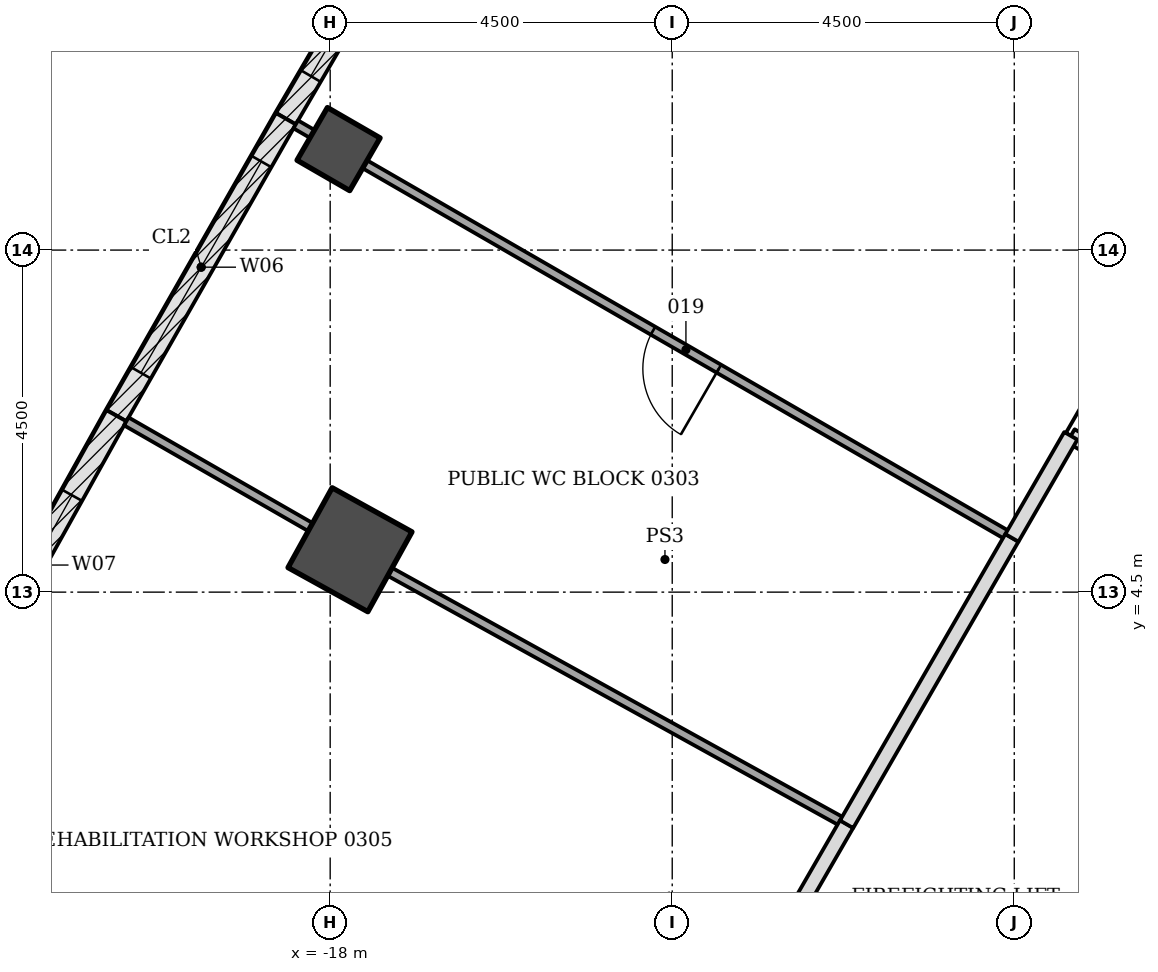
"""IFC4 building model, lengths in metres.
Left out: names, types, materials, properties, quantities, classifications, styles, units other than length and angle.
Written with IfcOpenShell. Run it as: python <this file> out.ifc"""

import sys

from ifc_helpers import new_model, si_unit, direction, frame, frame_2d, origin, origin_2d, place, context, subcontext, project, spatial, rectangle, extrude, element, fill, save


model = new_model("IFC4")
c1 = context("Model", 3, precision=1e-05, world=origin(), true_north=direction((0.0, 1.0)))
c2 = subcontext(c1, "Body", "Model", "MODEL_VIEW")
j1 = project(units=[si_unit("LENGTHUNIT", "METRE"), si_unit("PLANEANGLEUNIT", "RADIAN")], contexts=[c1])
p1 = place(None, origin())
s1 = spatial("IfcSite", under=j1, at=p1, CompositionType="ELEMENT")
p2 = place(p1, origin())
s2 = spatial("IfcBuilding", under=s1, at=p2, CompositionType="ELEMENT")
p3 = place(p2, frame((0.0, 0.0, 15.0)))
s3 = spatial("IfcBuildingStorey", under=s2, at=p3, CompositionType="ELEMENT", Elevation=15.0)
p4 = place(p3, frame((-17.739, 5.058, -0.25), z_axis=(0.0, 0.0, 1.0), x_axis=(-0.875152760281, 0.483846717641, 0.0)))
e1 = element("IfcColumn", 1, at=p4, inside=s3, PredefinedType="COLUMN", context=c2, shape_type="SweptSolid", body=[
    extrude(rectangle(XDim=1.2, YDim=1.2, at=origin_2d()), origin(), (0.0, 0.0, 1.0), 4.5),
])
p5 = place(p3, frame((-17.89, 10.329, -0.25), z_axis=(0.0, 0.0, 1.0), x_axis=(-0.866025403784, 0.5, 0.0)))
e2 = element("IfcColumn", 2, at=p5, inside=s3, PredefinedType="COLUMN", context=c2, shape_type="SweptSolid", body=[
    extrude(rectangle(XDim=0.8, YDim=0.8, at=origin_2d()), origin(), (0.0, 0.0, 1.0), 4.5),
])
p6 = place(p3, frame((-1.083, 11.281, -0.25), z_axis=(0.0, 0.0, 1.0), x_axis=(-0.500001446645, -0.866024568562, 0.0)))
e3 = element("IfcWall", 3, at=p6, inside=s3, PredefinedType="SHEAR", context=c2, shape_type="SweptSolid", body=[
    extrude(rectangle(XDim=18.458, YDim=0.7, at=frame_2d((9.229, 0.0))), origin(), (0.0, 0.0, 1.0), 4.5),
])
p7 = place(p6, frame((8.979, 0.0, 0.25)))
e4 = element("IfcOpeningElement", 4, at=p7, cuts=e3, PredefinedType="OPENING", context=c2, shape_type="SweptSolid", body=[
    extrude(rectangle(XDim=1.2, YDim=2.1, at=frame_2d((0.6, 1.05))), frame((0.0, 0.36, 0.0), z_axis=(0.0, -1.0, 0.0), x_axis=(1.0, 0.0, 0.0)), (0.0, 0.0, 1.0), 0.72),
])
p8 = place(p6, frame((11.029, 0.0, 0.25)))
e5 = element("IfcOpeningElement", 5, at=p8, cuts=e3, PredefinedType="OPENING", context=c2, shape_type="SweptSolid", body=[
    extrude(rectangle(XDim=1.2, YDim=2.1, at=frame_2d((0.6, 1.05))), frame((0.0, 0.36, 0.0), z_axis=(0.0, -1.0, 0.0), x_axis=(1.0, 0.0, 0.0)), (0.0, 0.0, 1.0), 0.72),
])
p9 = place(p3, frame((-18.582, 10.73, 0.0), z_axis=(0.0, 0.0, 1.0), x_axis=(0.50445499627, 0.86343798662, 0.0)))
e6 = element("IfcWall", 6, at=p9, inside=s3, PredefinedType="NOTDEFINED", context=c2, shape_type="SweptSolid", body=[
    extrude(rectangle(XDim=4.496, YDim=0.3, at=frame_2d((2.248, 0.0))), origin(), (0.0, 0.0, 1.0), 4.25),
])
p10 = place(p9, frame((0.648, 0.0, 0.8)))
e7 = element("IfcOpeningElement", 7, at=p10, cuts=e6, PredefinedType="OPENING", context=c2, shape_type="SweptSolid", body=[
    extrude(rectangle(XDim=3.2, YDim=2.7, at=frame_2d((1.6, 1.35))), frame((0.0, 0.16, 0.0), z_axis=(0.0, -1.0, 0.0), x_axis=(1.0, 0.0, 0.0)), (0.0, 0.0, 1.0), 0.32),
])
p11 = place(p3, frame((-20.811, 6.823, 0.0), z_axis=(0.0, 0.0, 1.0), x_axis=(0.495524760411, 0.868593812907, 0.0)))
e8 = element("IfcWall", 8, at=p11, inside=s3, PredefinedType="NOTDEFINED", context=c2, shape_type="SweptSolid", body=[
    extrude(rectangle(XDim=4.496, YDim=0.3, at=frame_2d((2.248, 0.0))), origin(), (0.0, 0.0, 1.0), 4.25),
])
p12 = place(p11, frame((0.648, 0.0, 0.8)))
e9 = element("IfcOpeningElement", 9, at=p12, cuts=e8, PredefinedType="OPENING", context=c2, shape_type="SweptSolid", body=[
    extrude(rectangle(XDim=3.2, YDim=2.7, at=frame_2d((1.6, 1.35))), frame((0.0, 0.16, 0.0), z_axis=(0.0, -1.0, 0.0), x_axis=(1.0, 0.0, 0.0)), (0.0, 0.0, 1.0), 0.32),
])
p13 = place(p3, frame((-23.0, 2.893, 0.0), z_axis=(0.0, 0.0, 1.0), x_axis=(0.486606252415, 0.873621402617, 0.0)))
e10 = element("IfcWall", 10, at=p13, inside=s3, PredefinedType="NOTDEFINED", context=c2, shape_type="SweptSolid", body=[
    extrude(rectangle(XDim=4.496, YDim=0.3, at=frame_2d((2.248, 0.0))), origin(), (0.0, 0.0, 1.0), 4.25),
])
p14 = place(p13, frame((1.198, 0.0, 0.8)))
e11 = element("IfcOpeningElement", 11, at=p14, cuts=e10, PredefinedType="OPENING", context=c2, shape_type="SweptSolid", body=[
    extrude(rectangle(XDim=2.1, YDim=3.0, at=frame_2d((1.05, 1.5))), frame((0.0, 0.16, 0.0), z_axis=(0.0, -1.0, 0.0), x_axis=(1.0, 0.0, 0.0)), (0.0, 0.0, 1.0), 0.32),
])
p15 = place(p3, frame((-12.635, -1.028, 0.0), z_axis=(0.0, 0.0, 1.0), x_axis=(0.499801250411, 0.866140121509, 0.0)))
e12 = element("IfcWall", 12, at=p15, inside=s3, PredefinedType="PARTITIONING", context=c2, shape_type="SweptSolid", body=[
    extrude(rectangle(XDim=2.861, YDim=0.2, at=frame_2d((1.431, 0.0))), origin(), (0.0, 0.0, 1.0), 3.638),
])
p16 = place(p3, frame((-18.26, 5.356, 0.0), z_axis=(0.0, 0.0, 1.0), x_axis=(-0.867283853893, 0.49781393791, 0.0)))
e13 = element("IfcWall", 13, at=p16, inside=s3, PredefinedType="PARTITIONING", context=c2, shape_type="SweptSolid", body=[
    extrude(rectangle(XDim=2.792, YDim=0.12, at=frame_2d((1.396, 0.0))), origin(), (0.0, 0.0, 1.0), 3.633),
])
p17 = place(p3, frame((-11.208, 1.446, 0.0), z_axis=(0.0, 0.0, 1.0), x_axis=(-0.875125393946, 0.483896212912, 0.0)))
e14 = element("IfcWall", 14, at=p17, inside=s3, PredefinedType="PARTITIONING", context=c2, shape_type="SweptSolid", body=[
    extrude(rectangle(XDim=6.863, YDim=0.12, at=frame_2d((3.432, 0.0))), origin(), (0.0, 0.0, 1.0), 3.638),
])
p18 = place(p3, frame((-9.032, 5.213, 0.0), z_axis=(0.0, 0.0, 1.0), x_axis=(-0.499876332206, -0.866096791646, 0.0)))
e15 = element("IfcWall", 15, at=p18, inside=s3, PredefinedType="PARTITIONING", context=c2, shape_type="SweptSolid", body=[
    extrude(rectangle(XDim=4.349, YDim=0.2, at=frame_2d((2.175, 0.0))), origin(), (0.0, 0.0, 1.0), 3.638),
])
p19 = place(p3, frame((-5.226, 4.806, 0.0), z_axis=(0.0, 0.0, 1.0), x_axis=(-0.865949687125, 0.500131122175, 0.0)))
e16 = element("IfcWall", 16, at=p19, inside=s3, PredefinedType="PARTITIONING", context=c2, shape_type="SweptSolid", body=[
    extrude(rectangle(XDim=3.499, YDim=0.2, at=frame_2d((1.75, 0.0))), origin(), (0.0, 0.0, 1.0), 4.25),
])
p20 = place(p19, frame((0.95, 0.0, 0.0)))
e17 = element("IfcOpeningElement", 17, at=p20, cuts=e16, PredefinedType="OPENING", context=c2, shape_type="SweptSolid", body=[
    extrude(rectangle(XDim=1.5, YDim=2.1, at=frame_2d((0.75, 1.05))), frame((0.0, 0.11, 0.0), z_axis=(0.0, -1.0, 0.0), x_axis=(1.0, 0.0, 0.0)), (0.0, 0.0, 1.0), 0.22),
])
p21 = place(p3, frame((-8.256, 6.556, 0.0), z_axis=(0.0, 0.0, 1.0), x_axis=(-0.500104332946, -0.86596515875, 0.0)))
e18 = element("IfcWall", 18, at=p21, inside=s3, PredefinedType="PARTITIONING", context=c2, shape_type="SweptSolid", body=[
    extrude(rectangle(XDim=1.55, YDim=0.2, at=frame_2d((0.775, 0.0))), origin(), (0.0, 0.0, 1.0), 3.638),
])
p22 = place(p3, frame((-18.236, 10.528, 0.0), z_axis=(0.0, 0.0, 1.0), x_axis=(-0.864625231999, 0.50241736454, 0.0)))
e19 = element("IfcWall", 19, at=p22, inside=s3, PredefinedType="PARTITIONING", context=c2, shape_type="SweptSolid", body=[
    extrude(rectangle(XDim=0.251, YDim=0.12, at=frame_2d((0.125, 0.0))), origin(), (0.0, 0.0, 1.0), 4.25),
])
p23 = place(p3, frame((-9.033, 5.214, 0.0), z_axis=(0.0, 0.0, 1.0), x_axis=(-0.866000641544, 0.500042887006, 0.0)))
e20 = element("IfcWall", 20, at=p23, inside=s3, PredefinedType="PARTITIONING", context=c2, shape_type="SweptSolid", body=[
    extrude(rectangle(XDim=9.827, YDim=0.12, at=frame_2d((4.914, 0.0))), origin(), (0.0, 0.0, 1.0), 3.638),
])
p24 = place(p23, frame((4.45, 0.0, 0.0)))
e21 = element("IfcOpeningElement", 21, at=p24, cuts=e20, PredefinedType="OPENING", context=c2, shape_type="SweptSolid", body=[
    extrude(rectangle(XDim=1.0, YDim=2.1, at=frame_2d((0.5, 1.05))), frame((0.0, 0.07, 0.0), z_axis=(0.0, -1.0, 0.0), x_axis=(1.0, 0.0, 0.0)), (0.0, 0.0, 1.0), 0.14),
])
p25 = place(p3, frame((-3.406, 14.956, 0.0), z_axis=(0.0, 0.0, 1.0), x_axis=(-0.500020940175, -0.866013313631, 0.0)))
e22 = element("IfcWall", 22, at=p25, inside=s3, PredefinedType="PARTITIONING", context=c2, shape_type="SweptSolid", body=[
    extrude(rectangle(XDim=9.7, YDim=0.15, at=frame_2d((4.85, 0.0))), origin(), (0.0, 0.0, 1.0), 3.638),
])
p26 = place(p25, frame((3.95, 0.0, 0.0)))
e23 = element("IfcOpeningElement", 23, at=p26, cuts=e22, PredefinedType="OPENING", context=c2, shape_type="SweptSolid", body=[
    extrude(rectangle(XDim=1.8, YDim=2.1, at=frame_2d((0.9, 1.05))), frame((0.0, 0.085, 0.0), z_axis=(0.0, -1.0, 0.0), x_axis=(1.0, 0.0, 0.0)), (0.0, 0.0, 1.0), 0.17),
])
p27 = place(p10, origin())
e24 = element("IfcWindow", 24, at=p27, inside=s3, PartitioningType="TRIPLE_PANEL_VERTICAL", PredefinedType="WINDOW", context=c2, shape_type="SweptSolid", body=[
    extrude(rectangle(XDim=3.2, YDim=2.7, at=frame_2d((1.6, 1.35))), frame((0.0, 0.03, 0.0), z_axis=(0.0, -1.0, 0.0), x_axis=(1.0, 0.0, 0.0)), (0.0, 0.0, 1.0), 0.06),
])
fill(e7, e24)
p28 = place(p12, origin())
e25 = element("IfcWindow", 25, at=p28, inside=s3, PartitioningType="TRIPLE_PANEL_VERTICAL", PredefinedType="WINDOW", context=c2, shape_type="SweptSolid", body=[
    extrude(rectangle(XDim=3.2, YDim=2.7, at=frame_2d((1.6, 1.35))), frame((0.0, 0.03, 0.0), z_axis=(0.0, -1.0, 0.0), x_axis=(1.0, 0.0, 0.0)), (0.0, 0.0, 1.0), 0.06),
])
fill(e9, e25)
p29 = place(p14, origin())
e26 = element("IfcWindow", 26, at=p29, inside=s3, PartitioningType="DOUBLE_PANEL_HORIZONTAL", PredefinedType="WINDOW", context=c2, shape_type="SweptSolid", body=[
    extrude(rectangle(XDim=2.1, YDim=3.0, at=frame_2d((1.05, 1.5))), frame((0.0, 0.03, 0.0), z_axis=(0.0, -1.0, 0.0), x_axis=(1.0, 0.0, 0.0)), (0.0, 0.0, 1.0), 0.06),
])
fill(e11, e26)
p30 = place(p24, origin())
e27 = element("IfcDoor", 27, at=p30, inside=s3, OperationType="SINGLE_SWING_RIGHT", PredefinedType="DOOR", context=c2, shape_type="SweptSolid", body=[
    extrude(rectangle(XDim=1.0, YDim=2.1, at=frame_2d((0.5, 1.05))), frame((0.0, 0.025, 0.0), z_axis=(0.0, -1.0, 0.0), x_axis=(1.0, 0.0, 0.0)), (0.0, 0.0, 1.0), 0.05),
])
fill(e21, e27)
save(model, sys.argv[1])
